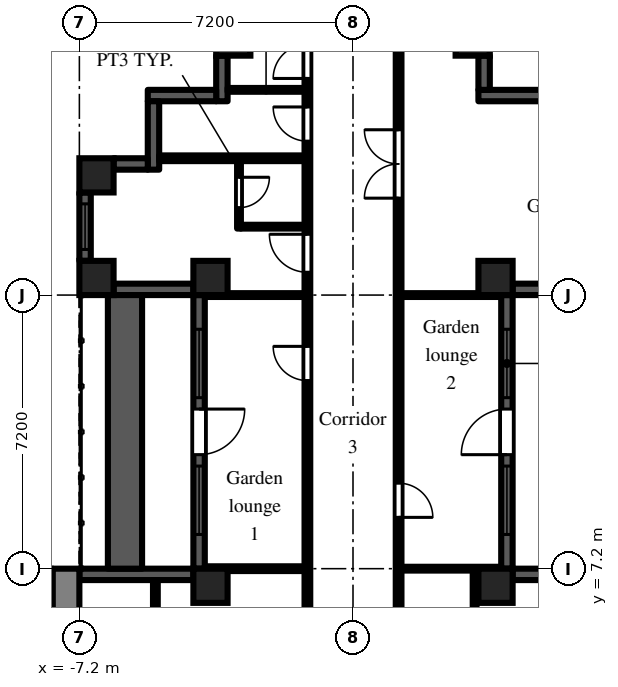
"""IFC4 building model, lengths in metres.
Left out: names, types, materials, properties, quantities, classifications, styles, units other than length and angle.
Written with IfcOpenShell. Run it as: python <this file> out.ifc"""

import sys

from ifc_helpers import new_model, si_unit, direction, frame, frame_2d, origin, origin_2d, place, context, subcontext, project, spatial, rectangle, extrude, element, fill, save


model = new_model("IFC4")
c1 = context("Model", 3, precision=1e-05, world=origin(), true_north=direction((0.0, 1.0)))
c2 = subcontext(c1, "Body", "Model", "MODEL_VIEW")
j1 = project(units=[si_unit("LENGTHUNIT", "METRE"), si_unit("PLANEANGLEUNIT", "RADIAN")], contexts=[c1])
p1 = place(None, origin())
s1 = spatial("IfcSite", under=j1, at=p1, CompositionType="ELEMENT")
p2 = place(p1, origin())
s2 = spatial("IfcBuilding", under=s1, at=p2, CompositionType="ELEMENT")
p3 = place(p2, frame((0.0, 0.0, 75.9)))
s3 = spatial("IfcBuildingStorey", under=s2, at=p3, CompositionType="ELEMENT", Elevation=75.9)
for number, where, z_axis, x_axis in (
    (1, (-6.75, 14.85, 0.0), (0.0, 0.0, 1.0), (1.0, 0.0, 0.0)),
    (2, (-6.75, 17.55, 0.0), (0.0, 0.0, 1.0), (1.0, 0.0, 0.0)),
    (3, (-3.75, 6.75, 0.0), (0.0, 0.0, 1.0), (1.0, 0.0, 0.0)),
    (4, (-3.75, 14.85, 0.0), (0.0, 0.0, 1.0), (1.0, 0.0, 0.0)),
    (5, (-3.15, 21.15, 0.0), (0.0, 0.0, 1.0), (1.0, 0.0, 0.0)),
    (6, (3.15, 21.15, 0.0), (0.0, 0.0, 1.0), (1.0, 0.0, 0.0)),
    (7, (3.75, 6.75, 0.0), (0.0, 0.0, 1.0), (1.0, 0.0, 0.0)),
    (8, (3.75, 14.85, 0.0), (0.0, 0.0, 1.0), (1.0, 0.0, 0.0)),
):
    element("IfcColumn", number, at=place(p3, frame(where, z_axis=z_axis, x_axis=x_axis)), inside=s3, PredefinedType="COLUMN", context=c2, shape_type="SweptSolid", body=[
        extrude(rectangle(XDim=0.9, YDim=0.9, at=origin_2d()), origin(), (0.0, 0.0, 1.0), 3.0),
    ])
p4 = place(p3, frame((7.2, 7.05, 0.0), z_axis=(0.0, 0.0, 1.0), x_axis=(-1.0, 0.0, 0.0)))
e9 = element("IfcWall", 9, at=p4, inside=s3, PredefinedType="SOLIDWALL", context=c2, shape_type="SweptSolid", body=[
    extrude(rectangle(XDim=3.0, YDim=0.3, at=frame_2d((1.5, 0.0))), origin(), (0.0, 0.0, 1.0), 2.1),
])
p5 = place(p3, frame((4.05, 7.2, 0.0), z_axis=(0.0, 0.0, 1.0), x_axis=(0.0, 1.0, 0.0)))
e10 = element("IfcWall", 10, at=p5, inside=s3, PredefinedType="SOLIDWALL", context=c2, shape_type="SweptSolid", body=[
    extrude(rectangle(XDim=7.2, YDim=0.3, at=frame_2d((3.6, 0.0))), origin(), (0.0, 0.0, 1.0), 2.1),
])
p6 = place(p5, frame((3.0, 0.0, 0.0)))
e11 = element("IfcOpeningElement", 11, at=p6, cuts=e10, PredefinedType="OPENING", context=c2, shape_type="SweptSolid", body=[
    extrude(rectangle(XDim=1.2, YDim=2.05, at=frame_2d((0.6, 1.025))), frame((0.0, 0.16, 0.0), z_axis=(0.0, -1.0, 0.0), x_axis=(1.0, 0.0, 0.0)), (0.0, 0.0, 1.0), 0.32),
])
p7 = place(p5, frame((0.9, 0.0, 0.2)))
e12 = element("IfcOpeningElement", 12, at=p7, cuts=e10, PredefinedType="OPENING", context=c2, shape_type="SweptSolid", body=[
    extrude(rectangle(XDim=1.8, YDim=1.85, at=frame_2d((0.9, 0.925))), frame((0.0, 0.16, 0.0), z_axis=(0.0, -1.0, 0.0), x_axis=(1.0, 0.0, 0.0)), (0.0, 0.0, 1.0), 0.32),
])
p8 = place(p5, frame((4.5, 0.0, 0.2)))
e13 = element("IfcOpeningElement", 13, at=p8, cuts=e10, PredefinedType="OPENING", context=c2, shape_type="SweptSolid", body=[
    extrude(rectangle(XDim=1.8, YDim=1.85, at=frame_2d((0.9, 0.925))), frame((0.0, 0.16, 0.0), z_axis=(0.0, -1.0, 0.0), x_axis=(1.0, 0.0, 0.0)), (0.0, 0.0, 1.0), 0.32),
])
p9 = place(p3, frame((4.2, 14.55, 0.0), z_axis=(0.0, 0.0, 1.0), x_axis=(1.0, 0.0, 0.0)))
e14 = element("IfcWall", 14, at=p9, inside=s3, PredefinedType="SOLIDWALL", context=c2, shape_type="SweptSolid", body=[
    extrude(rectangle(XDim=2.1, YDim=0.3, at=frame_2d((1.05, 0.0))), origin(), (0.0, 0.0, 1.0), 2.1),
])
p10 = place(p3, frame((5.1, 19.65, 0.0), z_axis=(0.0, 0.0, 1.0), x_axis=(-1.0, 0.0, 0.0)))
e15 = element("IfcWall", 15, at=p10, inside=s3, PredefinedType="SOLIDWALL", context=c2, shape_type="SweptSolid", body=[
    extrude(rectangle(XDim=1.8, YDim=0.3, at=frame_2d((0.9, 0.0))), origin(), (0.0, 0.0, 1.0), 2.575),
])
p11 = place(p3, frame((3.45, 19.8, 0.0), z_axis=(0.0, 0.0, 1.0), x_axis=(0.0, 1.0, 0.0)))
e16 = element("IfcWall", 16, at=p11, inside=s3, PredefinedType="SOLIDWALL", context=c2, shape_type="SweptSolid", body=[
    extrude(rectangle(XDim=0.9, YDim=0.3, at=frame_2d((0.45, 0.0))), origin(), (0.0, 0.0, 1.0), 2.575),
])
p12 = place(p3, frame((-3.45, 20.7, 0.0), z_axis=(0.0, 0.0, 1.0), x_axis=(0.0, -1.0, 0.0)))
e17 = element("IfcWall", 17, at=p12, inside=s3, PredefinedType="SOLIDWALL", context=c2, shape_type="SweptSolid", body=[
    extrude(rectangle(XDim=1.2, YDim=0.3, at=frame_2d((0.6, 0.0))), origin(), (0.0, 0.0, 1.0), 2.575),
])
p13 = place(p3, frame((-3.6, 19.65, 0.0), z_axis=(0.0, 0.0, 1.0), x_axis=(-1.0, 0.0, 0.0)))
e18 = element("IfcWall", 18, at=p13, inside=s3, PredefinedType="SOLIDWALL", context=c2, shape_type="SweptSolid", body=[
    extrude(rectangle(XDim=1.8, YDim=0.3, at=frame_2d((0.9, 0.0))), origin(), (0.0, 0.0, 1.0), 2.575),
])
p14 = place(p3, frame((-5.25, 19.5, 0.0), z_axis=(0.0, 0.0, 1.0), x_axis=(0.0, -1.0, 0.0)))
e19 = element("IfcWall", 19, at=p14, inside=s3, PredefinedType="SOLIDWALL", context=c2, shape_type="SweptSolid", body=[
    extrude(rectangle(XDim=1.8, YDim=0.3, at=frame_2d((0.9, 0.0))), origin(), (0.0, 0.0, 1.0), 2.575),
])
p15 = place(p3, frame((-5.4, 17.85, 0.0), z_axis=(0.0, 0.0, 1.0), x_axis=(-1.0, 0.0, 0.0)))
e20 = element("IfcWall", 20, at=p15, inside=s3, PredefinedType="SOLIDWALL", context=c2, shape_type="SweptSolid", body=[
    extrude(rectangle(XDim=0.9, YDim=0.3, at=frame_2d((0.45, 0.0))), origin(), (0.0, 0.0, 1.0), 2.575),
])
p16 = place(p3, frame((-7.05, 17.1, 0.0), z_axis=(0.0, 0.0, 1.0), x_axis=(0.0, -1.0, 0.0)))
e21 = element("IfcWall", 21, at=p16, inside=s3, PredefinedType="SOLIDWALL", context=c2, shape_type="SweptSolid", body=[
    extrude(rectangle(XDim=1.8, YDim=0.3, at=frame_2d((0.9, 0.0))), origin(), (0.0, 0.0, 1.0), 2.1),
])
p17 = place(p16, frame((0.3, 0.0, 0.2)))
e22 = element("IfcOpeningElement", 22, at=p17, cuts=e21, PredefinedType="OPENING", context=c2, shape_type="SweptSolid", body=[
    extrude(rectangle(XDim=1.2, YDim=1.85, at=frame_2d((0.6, 0.925))), frame((0.0, 0.16, 0.0), z_axis=(0.0, -1.0, 0.0), x_axis=(1.0, 0.0, 0.0)), (0.0, 0.0, 1.0), 0.32),
])
p18 = place(p3, frame((-6.3, 14.55, 0.0), z_axis=(0.0, 0.0, 1.0), x_axis=(1.0, 0.0, 0.0)))
e23 = element("IfcWall", 23, at=p18, inside=s3, PredefinedType="SOLIDWALL", context=c2, shape_type="SweptSolid", body=[
    extrude(rectangle(XDim=2.1, YDim=0.3, at=frame_2d((1.05, 0.0))), origin(), (0.0, 0.0, 1.0), 2.1),
])
p19 = place(p3, frame((-4.05, 14.4, 0.0), z_axis=(0.0, 0.0, 1.0), x_axis=(0.0, -1.0, 0.0)))
e24 = element("IfcWall", 24, at=p19, inside=s3, PredefinedType="SOLIDWALL", context=c2, shape_type="SweptSolid", body=[
    extrude(rectangle(XDim=7.2, YDim=0.3, at=frame_2d((3.6, 0.0))), origin(), (0.0, 0.0, 1.0), 2.1),
])
p20 = place(p19, frame((3.0, 0.0, 0.0)))
e25 = element("IfcOpeningElement", 25, at=p20, cuts=e24, PredefinedType="OPENING", context=c2, shape_type="SweptSolid", body=[
    extrude(rectangle(XDim=1.2, YDim=2.05, at=frame_2d((0.6, 1.025))), frame((0.0, 0.16, 0.0), z_axis=(0.0, -1.0, 0.0), x_axis=(1.0, 0.0, 0.0)), (0.0, 0.0, 1.0), 0.32),
])
p21 = place(p19, frame((0.9, 0.0, 0.2)))
e26 = element("IfcOpeningElement", 26, at=p21, cuts=e24, PredefinedType="OPENING", context=c2, shape_type="SweptSolid", body=[
    extrude(rectangle(XDim=1.8, YDim=1.85, at=frame_2d((0.9, 0.925))), frame((0.0, 0.16, 0.0), z_axis=(0.0, -1.0, 0.0), x_axis=(1.0, 0.0, 0.0)), (0.0, 0.0, 1.0), 0.32),
])
p22 = place(p19, frame((4.5, 0.0, 0.2)))
e27 = element("IfcOpeningElement", 27, at=p22, cuts=e24, PredefinedType="OPENING", context=c2, shape_type="SweptSolid", body=[
    extrude(rectangle(XDim=1.8, YDim=1.85, at=frame_2d((0.9, 0.925))), frame((0.0, 0.16, 0.0), z_axis=(0.0, -1.0, 0.0), x_axis=(1.0, 0.0, 0.0)), (0.0, 0.0, 1.0), 0.32),
])
p23 = place(p3, frame((-4.2, 7.05, 0.0), z_axis=(0.0, 0.0, 1.0), x_axis=(-1.0, 0.0, 0.0)))
e28 = element("IfcWall", 28, at=p23, inside=s3, PredefinedType="SOLIDWALL", context=c2, shape_type="SweptSolid", body=[
    extrude(rectangle(XDim=3.0, YDim=0.3, at=frame_2d((1.5, 0.0))), origin(), (0.0, 0.0, 1.0), 2.1),
])
p24 = place(p3, frame((-6.0, 7.2, 0.0), z_axis=(0.0, 0.0, 1.0), x_axis=(0.0, 1.0, 0.0)))
e29 = element("IfcWall", 29, at=p24, inside=s3, PredefinedType="PARAPET", context=c2, shape_type="SweptSolid", body=[
    extrude(rectangle(XDim=7.2, YDim=0.9, at=frame_2d((3.6, 0.0))), origin(), (0.0, 0.0, 1.0), 0.8),
])
p25 = place(p3, frame((-7.55, -7.2, 0.0), z_axis=(0.0, 0.0, 1.0), x_axis=(0.0, 1.0, 0.0)))
e30 = element("IfcWall", 30, at=p25, inside=s3, PredefinedType="SHEAR", context=c2, shape_type="SweptSolid", body=[
    extrude(rectangle(XDim=14.4, YDim=0.7, at=frame_2d((7.2, 0.0))), origin(), (0.0, 0.0, 1.0), 2.575),
])
p26 = place(p25, frame((6.0, 0.0, 0.0)))
e31 = element("IfcOpeningElement", 31, at=p26, cuts=e30, PredefinedType="OPENING", context=c2, shape_type="SweptSolid", body=[
    extrude(rectangle(XDim=2.4, YDim=2.2, at=frame_2d((1.2, 1.1))), frame((0.0, 0.36, 0.0), z_axis=(0.0, -1.0, 0.0), x_axis=(1.0, 0.0, 0.0)), (0.0, 0.0, 1.0), 0.72),
])
p27 = place(p3, frame((-5.2, 1.275, 0.0), z_axis=(0.0, 0.0, 1.0), x_axis=(0.0, 1.0, 0.0)))
e32 = element("IfcWall", 32, at=p27, inside=s3, PredefinedType="PARTITIONING", context=c2, shape_type="SweptSolid", body=[
    extrude(rectangle(XDim=5.625, YDim=0.125, at=frame_2d((2.812, 0.0))), origin(), (0.0, 0.0, 1.0), 2.575),
])
p28 = place(p3, frame((-5.1, 18.0, 0.0), z_axis=(0.0, 0.0, 1.0), x_axis=(1.0, 0.0, 0.0)))
e33 = element("IfcWall", 33, at=p28, inside=s3, PredefinedType="PARTITIONING", context=c2, shape_type="SweptSolid", body=[
    extrude(rectangle(XDim=3.825, YDim=0.15, at=frame_2d((1.913, 0.0))), origin(), (0.0, 0.0, 1.0), 2.575),
])
p29 = place(p3, frame((-3.9, 7.2, 0.0), z_axis=(0.0, 0.0, 1.0), x_axis=(1.0, 0.0, 0.0)))
e34 = element("IfcWall", 34, at=p29, inside=s3, PredefinedType="PARTITIONING", context=c2, shape_type="SweptSolid", body=[
    extrude(rectangle(XDim=2.625, YDim=0.125, at=frame_2d((1.312, 0.0))), origin(), (0.0, 0.0, 1.0), 2.575),
])
p30 = place(p3, frame((-3.9, 14.4, 0.0), z_axis=(0.0, 0.0, 1.0), x_axis=(1.0, 0.0, 0.0)))
e35 = element("IfcWall", 35, at=p30, inside=s3, PredefinedType="PARTITIONING", context=c2, shape_type="SweptSolid", body=[
    extrude(rectangle(XDim=2.625, YDim=0.1, at=frame_2d((1.312, 0.0))), origin(), (0.0, 0.0, 1.0), 2.575),
])
p31 = place(p3, frame((-3.3, 19.8, 0.0), z_axis=(0.0, 0.0, 1.0), x_axis=(1.0, 0.0, 0.0)))
e36 = element("IfcWall", 36, at=p31, inside=s3, PredefinedType="PARTITIONING", context=c2, shape_type="SweptSolid", body=[
    extrude(rectangle(XDim=2.025, YDim=0.1, at=frame_2d((1.013, 0.0))), origin(), (0.0, 0.0, 1.0), 2.575),
])
p32 = place(p3, frame((-3.0, 16.15, 0.0), z_axis=(0.0, 0.0, 1.0), x_axis=(0.0, 1.0, 0.0)))
e37 = element("IfcWall", 37, at=p32, inside=s3, PredefinedType="PARTITIONING", context=c2, shape_type="SweptSolid", body=[
    extrude(rectangle(XDim=1.775, YDim=0.1, at=frame_2d((0.888, 0.0))), origin(), (0.0, 0.0, 1.0), 2.575),
])
p33 = place(p32, frame((0.55, 0.0, 0.0)))
e38 = element("IfcOpeningElement", 38, at=p33, cuts=e37, PredefinedType="OPENING", context=c2, shape_type="SweptSolid", body=[
    extrude(rectangle(XDim=0.8, YDim=2.1, at=frame_2d((0.4, 1.05))), frame((0.0, 0.06, 0.0), z_axis=(0.0, -1.0, 0.0), x_axis=(1.0, 0.0, 0.0)), (0.0, 0.0, 1.0), 0.12),
])
p34 = place(p3, frame((-2.95, 16.2, 0.0), z_axis=(0.0, 0.0, 1.0), x_axis=(1.0, 0.0, 0.0)))
e39 = element("IfcWall", 39, at=p34, inside=s3, PredefinedType="PARTITIONING", context=c2, shape_type="SweptSolid", body=[
    extrude(rectangle(XDim=1.675, YDim=0.1, at=frame_2d((0.837, 0.0))), origin(), (0.0, 0.0, 1.0), 2.575),
])
p35 = place(p3, frame((-1.2, 1.275, 0.0), z_axis=(0.0, 0.0, 1.0), x_axis=(0.0, 1.0, 0.0)))
e40 = element("IfcWall", 40, at=p35, inside=s3, PredefinedType="PARTITIONING", context=c2, shape_type="SweptSolid", body=[
    extrude(rectangle(XDim=20.025, YDim=0.15, at=frame_2d((10.013, 0.0))), origin(), (0.0, 0.0, 1.0), 2.575),
])
p36 = place(p35, frame((2.475, 0.0, 0.0)))
e41 = element("IfcOpeningElement", 41, at=p36, cuts=e40, PredefinedType="OPENING", context=c2, shape_type="SweptSolid", body=[
    extrude(rectangle(XDim=0.9, YDim=2.1, at=frame_2d((0.45, 1.05))), frame((0.0, 0.085, 0.0), z_axis=(0.0, -1.0, 0.0), x_axis=(1.0, 0.0, 0.0)), (0.0, 0.0, 1.0), 0.17),
])
p37 = place(p35, frame((10.875, 0.0, 0.0)))
e42 = element("IfcOpeningElement", 42, at=p37, cuts=e40, PredefinedType="OPENING", context=c2, shape_type="SweptSolid", body=[
    extrude(rectangle(XDim=0.9, YDim=2.1, at=frame_2d((0.45, 1.05))), frame((0.0, 0.085, 0.0), z_axis=(0.0, -1.0, 0.0), x_axis=(1.0, 0.0, 0.0)), (0.0, 0.0, 1.0), 0.17),
])
p38 = place(p35, frame((13.725, 0.0, 0.0)))
e43 = element("IfcOpeningElement", 43, at=p38, cuts=e40, PredefinedType="OPENING", context=c2, shape_type="SweptSolid", body=[
    extrude(rectangle(XDim=1.0, YDim=2.1, at=frame_2d((0.5, 1.05))), frame((0.0, 0.085, 0.0), z_axis=(0.0, -1.0, 0.0), x_axis=(1.0, 0.0, 0.0)), (0.0, 0.0, 1.0), 0.17),
])
p39 = place(p35, frame((17.175, 0.0, 0.0)))
e44 = element("IfcOpeningElement", 44, at=p39, cuts=e40, PredefinedType="OPENING", context=c2, shape_type="SweptSolid", body=[
    extrude(rectangle(XDim=0.9, YDim=2.1, at=frame_2d((0.45, 1.05))), frame((0.0, 0.085, 0.0), z_axis=(0.0, -1.0, 0.0), x_axis=(1.0, 0.0, 0.0)), (0.0, 0.0, 1.0), 0.17),
])
p40 = place(p35, frame((18.825, 0.0, 0.0)))
e45 = element("IfcOpeningElement", 45, at=p40, cuts=e40, PredefinedType="OPENING", context=c2, shape_type="SweptSolid", body=[
    extrude(rectangle(XDim=0.9, YDim=2.1, at=frame_2d((0.45, 1.05))), frame((0.0, 0.085, 0.0), z_axis=(0.0, -1.0, 0.0), x_axis=(1.0, 0.0, 0.0)), (0.0, 0.0, 1.0), 0.17),
])
p41 = place(p3, frame((1.2, 1.125, 0.0), z_axis=(0.0, 0.0, 1.0), x_axis=(0.0, 1.0, 0.0)))
e46 = element("IfcWall", 46, at=p41, inside=s3, PredefinedType="PARTITIONING", context=c2, shape_type="SweptSolid", body=[
    extrude(rectangle(XDim=20.175, YDim=0.15, at=frame_2d((10.087, 0.0))), origin(), (0.0, 0.0, 1.0), 2.575),
])
p42 = place(p41, frame((2.625, 0.0, 0.0)))
e47 = element("IfcOpeningElement", 47, at=p42, cuts=e46, PredefinedType="OPENING", context=c2, shape_type="SweptSolid", body=[
    extrude(rectangle(XDim=0.9, YDim=2.1, at=frame_2d((0.45, 1.05))), frame((0.0, 0.085, 0.0), z_axis=(0.0, -1.0, 0.0), x_axis=(1.0, 0.0, 0.0)), (0.0, 0.0, 1.0), 0.17),
])
p43 = place(p41, frame((7.425, 0.0, 0.0)))
e48 = element("IfcOpeningElement", 48, at=p43, cuts=e46, PredefinedType="OPENING", context=c2, shape_type="SweptSolid", body=[
    extrude(rectangle(XDim=0.9, YDim=2.1, at=frame_2d((0.45, 1.05))), frame((0.0, 0.085, 0.0), z_axis=(0.0, -1.0, 0.0), x_axis=(1.0, 0.0, 0.0)), (0.0, 0.0, 1.0), 0.17),
])
p44 = place(p41, frame((15.825, 0.0, 0.0)))
e49 = element("IfcOpeningElement", 49, at=p44, cuts=e46, PredefinedType="OPENING", context=c2, shape_type="SweptSolid", body=[
    extrude(rectangle(XDim=1.8, YDim=2.1, at=frame_2d((0.9, 1.05))), frame((0.0, 0.085, 0.0), z_axis=(0.0, -1.0, 0.0), x_axis=(1.0, 0.0, 0.0)), (0.0, 0.0, 1.0), 0.17),
])
for number, where, z_axis, x_axis in (
    (50, (1.275, 7.2, 0.0), (0.0, 0.0, 1.0), (1.0, 0.0, 0.0)),
    (51, (1.275, 14.4, 0.0), (0.0, 0.0, 1.0), (1.0, 0.0, 0.0)),
):
    element("IfcWall", number, at=place(p3, frame(where, z_axis=z_axis, x_axis=x_axis)), inside=s3, PredefinedType="PARTITIONING", context=c2, shape_type="SweptSolid", body=[
        extrude(rectangle(XDim=2.625, YDim=0.1, at=frame_2d((1.312, 0.0))), origin(), (0.0, 0.0, 1.0), 2.575),
    ])
p45 = place(p3, frame((3.2, 1.275, 0.0), z_axis=(0.0, 0.0, 1.0), x_axis=(0.0, 1.0, 0.0)))
e52 = element("IfcWall", 52, at=p45, inside=s3, PredefinedType="PARTITIONING", context=c2, shape_type="SweptSolid", body=[
    extrude(rectangle(XDim=5.875, YDim=0.1, at=frame_2d((2.938, 0.0))), origin(), (0.0, 0.0, 1.0), 2.575),
])
p46 = place(p6, origin())
e53 = element("IfcDoor", 53, at=p46, inside=s3, OperationType="SINGLE_SWING_LEFT", PredefinedType="DOOR", context=c2, shape_type="SweptSolid", body=[
    extrude(rectangle(XDim=1.2, YDim=2.05, at=frame_2d((0.6, 1.025))), frame((0.0, 0.025, 0.0), z_axis=(0.0, -1.0, 0.0), x_axis=(1.0, 0.0, 0.0)), (0.0, 0.0, 1.0), 0.05),
])
fill(e11, e53)
p47 = place(p7, origin())
e54 = element("IfcWindow", 54, at=p47, inside=s3, PartitioningType="SINGLE_PANEL", PredefinedType="WINDOW", context=c2, shape_type="SweptSolid", body=[
    extrude(rectangle(XDim=1.8, YDim=1.85, at=frame_2d((0.9, 0.925))), frame((0.0, 0.03, 0.0), z_axis=(0.0, -1.0, 0.0), x_axis=(1.0, 0.0, 0.0)), (0.0, 0.0, 1.0), 0.06),
])
fill(e12, e54)
p48 = place(p8, origin())
e55 = element("IfcWindow", 55, at=p48, inside=s3, PartitioningType="SINGLE_PANEL", PredefinedType="WINDOW", context=c2, shape_type="SweptSolid", body=[
    extrude(rectangle(XDim=1.8, YDim=1.85, at=frame_2d((0.9, 0.925))), frame((0.0, 0.03, 0.0), z_axis=(0.0, -1.0, 0.0), x_axis=(1.0, 0.0, 0.0)), (0.0, 0.0, 1.0), 0.06),
])
fill(e13, e55)
p49 = place(p17, origin())
e56 = element("IfcWindow", 56, at=p49, inside=s3, PartitioningType="SINGLE_PANEL", PredefinedType="WINDOW", context=c2, shape_type="SweptSolid", body=[
    extrude(rectangle(XDim=1.2, YDim=1.85, at=frame_2d((0.6, 0.925))), frame((0.0, 0.03, 0.0), z_axis=(0.0, -1.0, 0.0), x_axis=(1.0, 0.0, 0.0)), (0.0, 0.0, 1.0), 0.06),
])
fill(e22, e56)
p50 = place(p20, origin())
e57 = element("IfcDoor", 57, at=p50, inside=s3, OperationType="SINGLE_SWING_LEFT", PredefinedType="DOOR", context=c2, shape_type="SweptSolid", body=[
    extrude(rectangle(XDim=1.2, YDim=2.05, at=frame_2d((0.6, 1.025))), frame((0.0, 0.025, 0.0), z_axis=(0.0, -1.0, 0.0), x_axis=(1.0, 0.0, 0.0)), (0.0, 0.0, 1.0), 0.05),
])
fill(e25, e57)
p51 = place(p21, origin())
e58 = element("IfcWindow", 58, at=p51, inside=s3, PartitioningType="SINGLE_PANEL", PredefinedType="WINDOW", context=c2, shape_type="SweptSolid", body=[
    extrude(rectangle(XDim=1.8, YDim=1.85, at=frame_2d((0.9, 0.925))), frame((0.0, 0.03, 0.0), z_axis=(0.0, -1.0, 0.0), x_axis=(1.0, 0.0, 0.0)), (0.0, 0.0, 1.0), 0.06),
])
fill(e26, e58)
p52 = place(p22, origin())
e59 = element("IfcWindow", 59, at=p52, inside=s3, PartitioningType="SINGLE_PANEL", PredefinedType="WINDOW", context=c2, shape_type="SweptSolid", body=[
    extrude(rectangle(XDim=1.8, YDim=1.85, at=frame_2d((0.9, 0.925))), frame((0.0, 0.03, 0.0), z_axis=(0.0, -1.0, 0.0), x_axis=(1.0, 0.0, 0.0)), (0.0, 0.0, 1.0), 0.06),
])
fill(e27, e59)
p53 = place(p37, origin())
e60 = element("IfcDoor", 60, at=p53, inside=s3, OperationType="SINGLE_SWING_RIGHT", PredefinedType="DOOR", context=c2, shape_type="SweptSolid", body=[
    extrude(rectangle(XDim=0.9, YDim=2.1, at=frame_2d((0.45, 1.05))), frame((0.0, 0.025, 0.0), z_axis=(0.0, -1.0, 0.0), x_axis=(1.0, 0.0, 0.0)), (0.0, 0.0, 1.0), 0.05),
])
fill(e42, e60)
p54 = place(p33, frame((0.8, 0.0, 0.0), z_axis=(0.0, 0.0, 1.0), x_axis=(-1.0, 0.0, 0.0)))
e61 = element("IfcDoor", 61, at=p54, inside=s3, OperationType="SINGLE_SWING_LEFT", PredefinedType="DOOR", context=c2, shape_type="SweptSolid", body=[
    extrude(rectangle(XDim=0.8, YDim=2.1, at=frame_2d((0.4, 1.05))), frame((0.0, 0.025, 0.0), z_axis=(0.0, -1.0, 0.0), x_axis=(1.0, 0.0, 0.0)), (0.0, 0.0, 1.0), 0.05),
])
fill(e38, e61)
p55 = place(p38, origin())
e62 = element("IfcDoor", 62, at=p55, inside=s3, OperationType="SINGLE_SWING_RIGHT", PredefinedType="DOOR", context=c2, shape_type="SweptSolid", body=[
    extrude(rectangle(XDim=1.0, YDim=2.1, at=frame_2d((0.5, 1.05))), frame((0.0, 0.025, 0.0), z_axis=(0.0, -1.0, 0.0), x_axis=(1.0, 0.0, 0.0)), (0.0, 0.0, 1.0), 0.05),
])
fill(e43, e62)
p56 = place(p39, origin())
e63 = element("IfcDoor", 63, at=p56, inside=s3, OperationType="SINGLE_SWING_RIGHT", PredefinedType="DOOR", context=c2, shape_type="SweptSolid", body=[
    extrude(rectangle(XDim=0.9, YDim=2.1, at=frame_2d((0.45, 1.05))), frame((0.0, 0.025, 0.0), z_axis=(0.0, -1.0, 0.0), x_axis=(1.0, 0.0, 0.0)), (0.0, 0.0, 1.0), 0.05),
])
fill(e44, e63)
p57 = place(p40, origin())
e64 = element("IfcDoor", 64, at=p57, inside=s3, OperationType="SINGLE_SWING_LEFT", PredefinedType="DOOR", context=c2, shape_type="SweptSolid", body=[
    extrude(rectangle(XDim=0.9, YDim=2.1, at=frame_2d((0.45, 1.05))), frame((0.0, 0.025, 0.0), z_axis=(0.0, -1.0, 0.0), x_axis=(1.0, 0.0, 0.0)), (0.0, 0.0, 1.0), 0.05),
])
fill(e45, e64)
p58 = place(p43, frame((0.9, 0.0, 0.0), z_axis=(0.0, 0.0, 1.0), x_axis=(-1.0, 0.0, 0.0)))
e65 = element("IfcDoor", 65, at=p58, inside=s3, OperationType="SINGLE_SWING_RIGHT", PredefinedType="DOOR", context=c2, shape_type="SweptSolid", body=[
    extrude(rectangle(XDim=0.9, YDim=2.1, at=frame_2d((0.45, 1.05))), frame((0.0, 0.025, 0.0), z_axis=(0.0, -1.0, 0.0), x_axis=(1.0, 0.0, 0.0)), (0.0, 0.0, 1.0), 0.05),
])
fill(e48, e65)
p59 = place(p44, origin())
e66 = element("IfcDoor", 66, at=p59, inside=s3, OperationType="DOUBLE_DOOR_DOUBLE_SWING", PredefinedType="DOOR", context=c2, shape_type="SweptSolid", body=[
    extrude(rectangle(XDim=1.8, YDim=2.1, at=frame_2d((0.9, 1.05))), frame((0.0, 0.025, 0.0), z_axis=(0.0, -1.0, 0.0), x_axis=(1.0, 0.0, 0.0)), (0.0, 0.0, 1.0), 0.05),
])
fill(e49, e66)
save(model, sys.argv[1])
